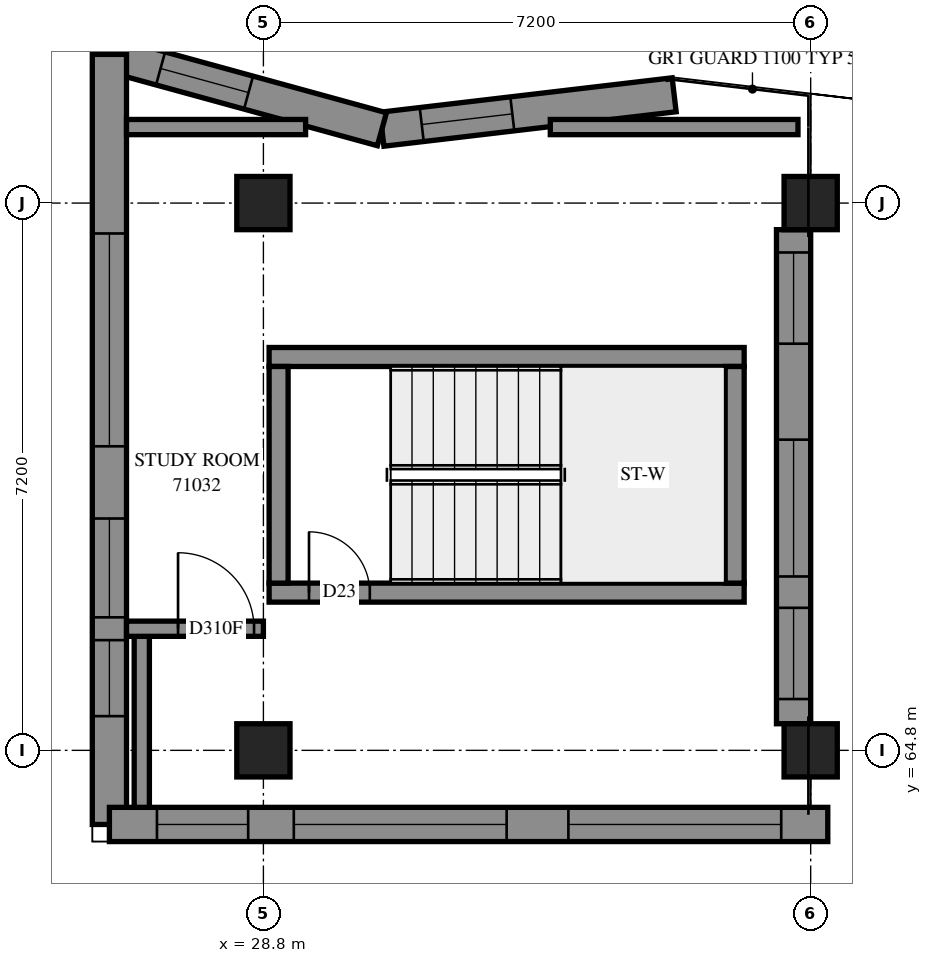
"""IFC4 building model, lengths in metres.
Left out: names, types, materials, properties, quantities, classifications, styles, units other than length and angle.
Written with IfcOpenShell. Run it as: python <this file> out.ifc"""

import sys

from ifc_helpers import new_model, si_unit, direction, frame, frame_2d, origin, origin_2d, place, context, subcontext, project, spatial, polyline, rectangle, outline, extrude, element, fill, save


model = new_model("IFC4")
c1 = context("Model", 3, precision=1e-05, world=origin(), true_north=direction((0.0, 1.0)))
c2 = subcontext(c1, "Body", "Model", "MODEL_VIEW")
j1 = project(units=[si_unit("LENGTHUNIT", "METRE"), si_unit("PLANEANGLEUNIT", "RADIAN")], contexts=[c1])
p1 = place(None, origin())
s1 = spatial("IfcSite", under=j1, at=p1, CompositionType="ELEMENT")
p2 = place(p1, origin())
s2 = spatial("IfcBuilding", under=s1, at=p2, CompositionType="ELEMENT")
p3 = place(p2, frame((0.0, 0.0, 260.8)))
s3 = spatial("IfcBuildingStorey", under=s2, at=p3, CompositionType="ELEMENT", Elevation=260.8)
for number, where, z_axis, x_axis in (
    (1, (28.8, 64.8, 0.0), (0.0, 0.0, 1.0), (1.0, 0.0, 0.0)),
    (2, (28.8, 72.0, 0.0), (0.0, 0.0, 1.0), (1.0, 0.0, 0.0)),
    (3, (36.0, 64.8, 0.0), (0.0, 0.0, 1.0), (1.0, 0.0, 0.0)),
    (4, (36.0, 72.0, 0.0), (0.0, 0.0, 1.0), (1.0, 0.0, 0.0)),
):
    element("IfcColumn", number, at=place(p3, frame(where, z_axis=z_axis, x_axis=x_axis)), inside=s3, PredefinedType="COLUMN", context=c2, shape_type="SweptSolid", body=[
        extrude(rectangle(XDim=0.7, YDim=0.7, at=origin_2d()), origin(), (0.0, 0.0, 1.0), 3.1),
    ])
p4 = place(p3, frame((34.204, 73.424, 0.0), z_axis=(0.0, 0.0, 1.0), x_axis=(-0.9931301358, -0.1170150991, 0.0)))
e5 = element("IfcWall", 5, at=p4, inside=s3, PredefinedType="SOLIDWALL", context=c2, shape_type="SweptSolid", body=[
    extrude(outline(polyline([(-0.026, -0.225), (3.827, -0.225), (3.915, 0.225), (0.026, 0.225), (-0.026, -0.225)])), origin(), (0.0, 0.0, 1.0), 3.1),
])
p5 = place(p4, frame((2.144, 0.0, 0.45)))
e6 = element("IfcOpeningElement", 6, at=p5, cuts=e5, PredefinedType="OPENING", context=c2, shape_type="SweptSolid", body=[
    extrude(rectangle(XDim=1.2, YDim=2.55, at=frame_2d((0.6, 1.275))), frame((0.0, 0.235, 0.0), z_axis=(0.0, -1.0, 0.0), x_axis=(1.0, 0.0, 0.0)), (0.0, 0.0, 1.0), 0.47),
])
p6 = place(p3, frame((30.359, 72.971, 0.0), z_axis=(0.0, 0.0, 1.0), x_axis=(-0.9643017755, 0.264805751, 0.0)))
e7 = element("IfcWall", 7, at=p6, inside=s3, PredefinedType="SOLIDWALL", context=c2, shape_type="SweptSolid", body=[
    extrude(outline(polyline([(0.044, -0.225), (4.013, -0.225), (3.423, 0.225), (-0.044, 0.225), (0.044, -0.225)])), origin(), (0.0, 0.0, 1.0), 3.1),
])
p7 = place(p6, frame((1.82, 0.0, 0.45)))
e8 = element("IfcOpeningElement", 8, at=p7, cuts=e7, PredefinedType="OPENING", context=c2, shape_type="SweptSolid", body=[
    extrude(rectangle(XDim=1.2, YDim=2.55, at=frame_2d((0.6, 1.275))), frame((0.0, 0.235, 0.0), z_axis=(0.0, -1.0, 0.0), x_axis=(1.0, 0.0, 0.0)), (0.0, 0.0, 1.0), 0.47),
])
p8 = place(p3, frame((26.774, 73.956, 0.0), z_axis=(0.0, 0.0, 1.0), x_axis=(0.0, -1.0, 0.0)))
e9 = element("IfcWall", 9, at=p8, inside=s3, PredefinedType="SOLIDWALL", context=c2, shape_type="SweptSolid", body=[
    extrude(outline(polyline([(-0.295, -0.225), (10.356, -0.225), (9.906, 0.225), (0.295, 0.225), (-0.295, -0.225)])), origin(), (0.0, 0.0, 1.0), 3.1),
])
p9 = place(p8, frame((2.356, 0.0, 0.45)))
e10 = element("IfcOpeningElement", 10, at=p9, cuts=e9, PredefinedType="OPENING", context=c2, shape_type="SweptSolid", body=[
    extrude(rectangle(XDim=2.8, YDim=2.55, at=frame_2d((1.4, 1.275))), frame((0.0, 0.235, 0.0), z_axis=(0.0, -1.0, 0.0), x_axis=(1.0, 0.0, 0.0)), (0.0, 0.0, 1.0), 0.47),
])
p10 = place(p8, frame((6.106, 0.0, 0.45)))
e11 = element("IfcOpeningElement", 11, at=p10, cuts=e9, PredefinedType="OPENING", context=c2, shape_type="SweptSolid", body=[
    extrude(rectangle(XDim=1.3, YDim=2.5, at=frame_2d((0.65, 1.25))), frame((0.0, 0.235, 0.0), z_axis=(0.0, -1.0, 0.0), x_axis=(1.0, 0.0, 0.0)), (0.0, 0.0, 1.0), 0.47),
])
p11 = place(p8, frame((7.706, 0.0, 0.45)))
e12 = element("IfcOpeningElement", 12, at=p11, cuts=e9, PredefinedType="OPENING", context=c2, shape_type="SweptSolid", body=[
    extrude(rectangle(XDim=1.0, YDim=2.5, at=frame_2d((0.5, 1.25))), frame((0.0, 0.235, 0.0), z_axis=(0.0, -1.0, 0.0), x_axis=(1.0, 0.0, 0.0)), (0.0, 0.0, 1.0), 0.47),
])
p12 = place(p3, frame((26.774, 63.825, 0.0), z_axis=(0.0, 0.0, 1.0), x_axis=(1.0, 0.0, 0.0)))
e13 = element("IfcWall", 13, at=p12, inside=s3, PredefinedType="SOLIDWALL", context=c2, shape_type="SweptSolid", body=[
    extrude(outline(polyline([(-0.225, -0.225), (9.226, -0.225), (9.676, 0.225), (0.225, 0.225), (-0.225, -0.225)])), origin(), (0.0, 0.0, 1.0), 3.1),
])
p13 = place(p12, frame((2.426, 0.0, 0.45)))
e14 = element("IfcOpeningElement", 14, at=p13, cuts=e13, PredefinedType="OPENING", context=c2, shape_type="SweptSolid", body=[
    extrude(rectangle(XDim=2.8, YDim=2.55, at=frame_2d((1.4, 1.275))), frame((0.0, 0.235, 0.0), z_axis=(0.0, -1.0, 0.0), x_axis=(1.0, 0.0, 0.0)), (0.0, 0.0, 1.0), 0.47),
])
p14 = place(p12, frame((6.038, 0.0, 0.45)))
e15 = element("IfcOpeningElement", 15, at=p14, cuts=e13, PredefinedType="OPENING", context=c2, shape_type="SweptSolid", body=[
    extrude(rectangle(XDim=2.8, YDim=2.55, at=frame_2d((1.4, 1.275))), frame((0.0, 0.235, 0.0), z_axis=(0.0, -1.0, 0.0), x_axis=(1.0, 0.0, 0.0)), (0.0, 0.0, 1.0), 0.47),
])
p15 = place(p12, frame((0.625, 0.0, 0.45)))
e16 = element("IfcOpeningElement", 16, at=p15, cuts=e13, PredefinedType="OPENING", context=c2, shape_type="SweptSolid", body=[
    extrude(rectangle(XDim=1.2, YDim=2.55, at=frame_2d((0.6, 1.275))), frame((0.0, 0.235, 0.0), z_axis=(0.0, -1.0, 0.0), x_axis=(1.0, 0.0, 0.0)), (0.0, 0.0, 1.0), 0.47),
])
p16 = place(p3, frame((35.775, 65.15, 0.0), z_axis=(0.0, 0.0, 1.0), x_axis=(0.0, 1.0, 0.0)))
e17 = element("IfcWall", 17, at=p16, inside=s3, PredefinedType="SOLIDWALL", context=c2, shape_type="SweptSolid", body=[
    extrude(rectangle(XDim=6.5, YDim=0.45, at=frame_2d((3.25, 0.0))), origin(), (0.0, 0.0, 1.0), 3.1),
])
p17 = place(p16, frame((0.325, 0.0, 0.6)))
e18 = element("IfcOpeningElement", 18, at=p17, cuts=e17, PredefinedType="OPENING", context=c2, shape_type="SweptSolid", body=[
    extrude(rectangle(XDim=1.2, YDim=1.9, at=frame_2d((0.6, 0.95))), frame((0.0, 0.235, 0.0), z_axis=(0.0, -1.0, 0.0), x_axis=(1.0, 0.0, 0.0)), (0.0, 0.0, 1.0), 0.47),
])
p18 = place(p16, frame((1.938, 0.0, 0.7)))
e19 = element("IfcOpeningElement", 19, at=p18, cuts=e17, PredefinedType="OPENING", context=c2, shape_type="SweptSolid", body=[
    extrude(rectangle(XDim=1.8, YDim=1.8, at=frame_2d((0.9, 0.9))), frame((0.0, 0.235, 0.0), z_axis=(0.0, -1.0, 0.0), x_axis=(1.0, 0.0, 0.0)), (0.0, 0.0, 1.0), 0.47),
])
p19 = place(p16, frame((5.0, 0.0, 0.6)))
e20 = element("IfcOpeningElement", 20, at=p19, cuts=e17, PredefinedType="OPENING", context=c2, shape_type="SweptSolid", body=[
    extrude(rectangle(XDim=1.2, YDim=1.9, at=frame_2d((0.6, 0.95))), frame((0.0, 0.235, 0.0), z_axis=(0.0, -1.0, 0.0), x_axis=(1.0, 0.0, 0.0)), (0.0, 0.0, 1.0), 0.47),
])
p20 = place(p3, frame((28.875, 66.875, -0.3), z_axis=(0.0, 0.0, 1.0), x_axis=(1.0, 0.0, 0.0)))
e21 = element("IfcWall", 21, at=p20, inside=s3, PredefinedType="SOLIDWALL", context=c2, shape_type="SweptSolid", body=[
    extrude(rectangle(XDim=6.25, YDim=0.25, at=frame_2d((3.125, 0.0))), origin(), (0.0, 0.0, 1.0), 3.4),
])
p21 = place(p20, frame((0.525, 0.0, 0.3)))
e22 = element("IfcOpeningElement", 22, at=p21, cuts=e21, PredefinedType="OPENING", context=c2, shape_type="SweptSolid", body=[
    extrude(rectangle(XDim=0.8, YDim=2.1, at=frame_2d((0.4, 1.05))), frame((0.0, 0.135, 0.0), z_axis=(0.0, -1.0, 0.0), x_axis=(1.0, 0.0, 0.0)), (0.0, 0.0, 1.0), 0.27),
])
p22 = place(p3, frame((28.875, 69.975, -0.3), z_axis=(0.0, 0.0, 1.0), x_axis=(1.0, 0.0, 0.0)))
e23 = element("IfcWall", 23, at=p22, inside=s3, PredefinedType="SOLIDWALL", context=c2, shape_type="SweptSolid", body=[
    extrude(rectangle(XDim=6.25, YDim=0.25, at=frame_2d((3.125, 0.0))), origin(), (0.0, 0.0, 1.0), 3.4),
])
for number, where, z_axis, x_axis in (
    (24, (29.0, 67.0, -0.3), (0.0, 0.0, 1.0), (0.0, 1.0, 0.0)),
    (25, (35.0, 67.0, -0.3), (0.0, 0.0, 1.0), (0.0, 1.0, 0.0)),
):
    element("IfcWall", number, at=place(p3, frame(where, z_axis=z_axis, x_axis=x_axis)), inside=s3, PredefinedType="SOLIDWALL", context=c2, shape_type="SweptSolid", body=[
        extrude(rectangle(XDim=2.85, YDim=0.25, at=frame_2d((1.425, 0.0))), origin(), (0.0, 0.0, 1.0), 3.4),
    ])
p23 = place(p3, frame((32.574, 73.0, 0.0), z_axis=(0.0, 0.0, 1.0), x_axis=(1.0, 0.0, 0.0)))
e26 = element("IfcWall", 26, at=p23, inside=s3, PredefinedType="PARTITIONING", context=c2, shape_type="SweptSolid", body=[
    extrude(rectangle(XDim=3.259, YDim=0.2, at=frame_2d((1.629, 0.0))), origin(), (0.0, 0.0, 1.0), 3.1),
])
p24 = place(p3, frame((26.999, 73.0, 0.0), z_axis=(0.0, 0.0, 1.0), x_axis=(1.0, 0.0, 0.0)))
e27 = element("IfcWall", 27, at=p24, inside=s3, PredefinedType="PARTITIONING", context=c2, shape_type="SweptSolid", body=[
    extrude(rectangle(XDim=2.356, YDim=0.2, at=frame_2d((1.178, 0.0))), origin(), (0.0, 0.0, 1.0), 3.1),
])
p25 = place(p3, frame((27.2, 64.05, 0.0), z_axis=(0.0, 0.0, 1.0), x_axis=(0.0, 1.0, 0.0)))
e28 = element("IfcWall", 28, at=p25, inside=s3, PredefinedType="PARTITIONING", context=c2, shape_type="SweptSolid", body=[
    extrude(rectangle(XDim=2.348, YDim=0.2, at=frame_2d((1.174, 0.0))), origin(), (0.0, 0.0, 1.0), 3.1),
])
p26 = place(p3, frame((26.999, 66.4, 0.0), z_axis=(0.0, 0.0, 1.0), x_axis=(1.0, 0.0, 0.0)))
e29 = element("IfcWall", 29, at=p26, inside=s3, PredefinedType="PARTITIONING", context=c2, shape_type="SweptSolid", body=[
    extrude(rectangle(XDim=1.801, YDim=0.2, at=frame_2d((0.9, 0.0))), origin(), (0.0, 0.0, 1.0), 3.1),
])
p27 = place(p26, frame((0.678, 0.0, 0.0)))
e30 = element("IfcOpeningElement", 30, at=p27, cuts=e29, PredefinedType="OPENING", context=c2, shape_type="SweptSolid", body=[
    extrude(rectangle(XDim=1.0, YDim=2.1, at=frame_2d((0.5, 1.05))), frame((0.0, 0.11, 0.0), z_axis=(0.0, -1.0, 0.0), x_axis=(1.0, 0.0, 0.0)), (0.0, 0.0, 1.0), 0.22),
])
p28 = place(p5, origin())
e31 = element("IfcWindow", 31, at=p28, inside=s3, PartitioningType="SINGLE_PANEL", PredefinedType="WINDOW", context=c2, shape_type="SweptSolid", body=[
    extrude(rectangle(XDim=1.2, YDim=2.55, at=frame_2d((0.6, 1.275))), frame((0.0, 0.205, 0.0), z_axis=(0.0, -1.0, 0.0), x_axis=(1.0, 0.0, 0.0)), (0.0, 0.0, 1.0), 0.06),
])
fill(e6, e31)
p29 = place(p7, origin())
e32 = element("IfcWindow", 32, at=p29, inside=s3, PartitioningType="SINGLE_PANEL", PredefinedType="WINDOW", context=c2, shape_type="SweptSolid", body=[
    extrude(rectangle(XDim=1.2, YDim=2.55, at=frame_2d((0.6, 1.275))), frame((0.0, 0.205, 0.0), z_axis=(0.0, -1.0, 0.0), x_axis=(1.0, 0.0, 0.0)), (0.0, 0.0, 1.0), 0.06),
])
fill(e8, e32)
p30 = place(p9, origin())
e33 = element("IfcWindow", 33, at=p30, inside=s3, PartitioningType="SINGLE_PANEL", PredefinedType="WINDOW", context=c2, shape_type="SweptSolid", body=[
    extrude(rectangle(XDim=2.8, YDim=2.55, at=frame_2d((1.4, 1.275))), frame((0.0, 0.205, 0.0), z_axis=(0.0, -1.0, 0.0), x_axis=(1.0, 0.0, 0.0)), (0.0, 0.0, 1.0), 0.06),
])
fill(e10, e33)
p31 = place(p13, origin())
e34 = element("IfcWindow", 34, at=p31, inside=s3, PartitioningType="SINGLE_PANEL", PredefinedType="WINDOW", context=c2, shape_type="SweptSolid", body=[
    extrude(rectangle(XDim=2.8, YDim=2.55, at=frame_2d((1.4, 1.275))), frame((0.0, 0.205, 0.0), z_axis=(0.0, -1.0, 0.0), x_axis=(1.0, 0.0, 0.0)), (0.0, 0.0, 1.0), 0.06),
])
fill(e14, e34)
p32 = place(p14, origin())
e35 = element("IfcWindow", 35, at=p32, inside=s3, PartitioningType="SINGLE_PANEL", PredefinedType="WINDOW", context=c2, shape_type="SweptSolid", body=[
    extrude(rectangle(XDim=2.8, YDim=2.55, at=frame_2d((1.4, 1.275))), frame((0.0, 0.205, 0.0), z_axis=(0.0, -1.0, 0.0), x_axis=(1.0, 0.0, 0.0)), (0.0, 0.0, 1.0), 0.06),
])
fill(e15, e35)
p33 = place(p15, origin())
e36 = element("IfcWindow", 36, at=p33, inside=s3, PartitioningType="SINGLE_PANEL", PredefinedType="WINDOW", context=c2, shape_type="SweptSolid", body=[
    extrude(rectangle(XDim=1.2, YDim=2.55, at=frame_2d((0.6, 1.275))), frame((0.0, 0.205, 0.0), z_axis=(0.0, -1.0, 0.0), x_axis=(1.0, 0.0, 0.0)), (0.0, 0.0, 1.0), 0.06),
])
fill(e16, e36)
p34 = place(p21, origin())
e37 = element("IfcDoor", 37, at=p34, inside=s3, OperationType="SINGLE_SWING_LEFT", PredefinedType="DOOR", context=c2, shape_type="SweptSolid", body=[
    extrude(rectangle(XDim=0.8, YDim=2.1, at=frame_2d((0.4, 1.05))), frame((0.0, 0.025, 0.0), z_axis=(0.0, -1.0, 0.0), x_axis=(1.0, 0.0, 0.0)), (0.0, 0.0, 1.0), 0.05),
])
fill(e22, e37)
p35 = place(p27, origin())
e38 = element("IfcDoor", 38, at=p35, inside=s3, OperationType="SINGLE_SWING_LEFT", PredefinedType="DOOR", context=c2, shape_type="SweptSolid", body=[
    extrude(rectangle(XDim=1.0, YDim=2.1, at=frame_2d((0.5, 1.05))), frame((0.0, 0.025, 0.0), z_axis=(0.0, -1.0, 0.0), x_axis=(1.0, 0.0, 0.0)), (0.0, 0.0, 1.0), 0.05),
])
fill(e30, e38)
p36 = place(p10, origin())
e39 = element("IfcWindow", 39, at=p36, inside=s3, PartitioningType="SINGLE_PANEL", PredefinedType="WINDOW", context=c2, shape_type="SweptSolid", body=[
    extrude(rectangle(XDim=1.3, YDim=2.5, at=frame_2d((0.65, 1.25))), frame((0.0, 0.205, 0.0), z_axis=(0.0, -1.0, 0.0), x_axis=(1.0, 0.0, 0.0)), (0.0, 0.0, 1.0), 0.06),
])
fill(e11, e39)
p37 = place(p11, origin())
e40 = element("IfcWindow", 40, at=p37, inside=s3, PartitioningType="SINGLE_PANEL", PredefinedType="WINDOW", context=c2, shape_type="SweptSolid", body=[
    extrude(rectangle(XDim=1.0, YDim=2.5, at=frame_2d((0.5, 1.25))), frame((0.0, 0.205, 0.0), z_axis=(0.0, -1.0, 0.0), x_axis=(1.0, 0.0, 0.0)), (0.0, 0.0, 1.0), 0.06),
])
fill(e12, e40)
p38 = place(p17, origin())
e41 = element("IfcWindow", 41, at=p38, inside=s3, PartitioningType="SINGLE_PANEL", PredefinedType="WINDOW", context=c2, shape_type="SweptSolid", body=[
    extrude(rectangle(XDim=1.2, YDim=1.9, at=frame_2d((0.6, 0.95))), frame((0.0, 0.205, 0.0), z_axis=(0.0, -1.0, 0.0), x_axis=(1.0, 0.0, 0.0)), (0.0, 0.0, 1.0), 0.06),
])
fill(e18, e41)
p39 = place(p18, origin())
e42 = element("IfcWindow", 42, at=p39, inside=s3, PartitioningType="SINGLE_PANEL", PredefinedType="WINDOW", context=c2, shape_type="SweptSolid", body=[
    extrude(rectangle(XDim=1.8, YDim=1.8, at=frame_2d((0.9, 0.9))), frame((0.0, 0.205, 0.0), z_axis=(0.0, -1.0, 0.0), x_axis=(1.0, 0.0, 0.0)), (0.0, 0.0, 1.0), 0.06),
])
fill(e19, e42)
p40 = place(p19, origin())
e43 = element("IfcWindow", 43, at=p40, inside=s3, PartitioningType="SINGLE_PANEL", PredefinedType="WINDOW", context=c2, shape_type="SweptSolid", body=[
    extrude(rectangle(XDim=1.2, YDim=1.9, at=frame_2d((0.6, 0.95))), frame((0.0, 0.205, 0.0), z_axis=(0.0, -1.0, 0.0), x_axis=(1.0, 0.0, 0.0)), (0.0, 0.0, 1.0), 0.06),
])
fill(e20, e43)
save(model, sys.argv[1])
